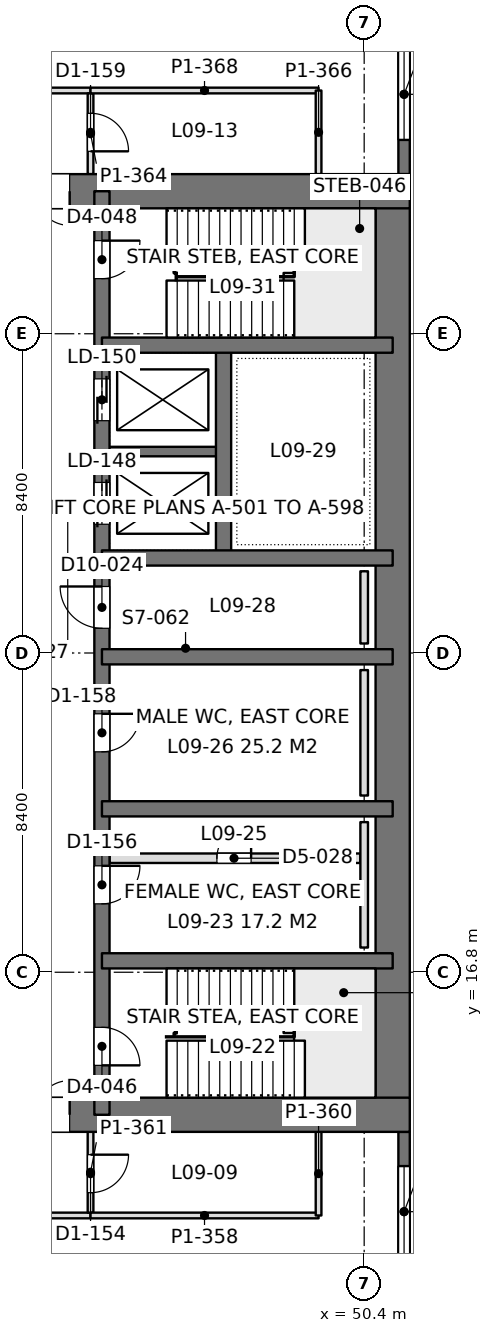
"""IFC4 building model, lengths in metres.
Left out: names, types, materials, properties, quantities, classifications, styles, units other than length and angle.
Written with IfcOpenShell. Run it as: python <this file> out.ifc"""

import sys

from ifc_helpers import new_model, si_unit, direction, frame, frame_2d, origin, place, context, subcontext, project, spatial, rectangle, extrude, element, fill, save


model = new_model("IFC4")
c1 = context("Model", 3, precision=1e-05, world=origin(), true_north=direction((0.0, 1.0)))
c2 = subcontext(c1, "Body", "Model", "MODEL_VIEW")
j1 = project(units=[si_unit("LENGTHUNIT", "METRE"), si_unit("PLANEANGLEUNIT", "RADIAN")], contexts=[c1])
p1 = place(None, origin())
s1 = spatial("IfcSite", under=j1, at=p1, CompositionType="ELEMENT")
p2 = place(p1, origin())
s2 = spatial("IfcBuilding", under=s1, at=p2, CompositionType="ELEMENT")
p3 = place(p2, frame((0.0, 0.0, 41.4)))
s3 = spatial("IfcBuildingStorey", under=s2, at=p3, CompositionType="ELEMENT", Elevation=41.4)
p4 = place(p3, frame((33.6, 13.05, 0.0), z_axis=(0.0, 0.0, 1.0), x_axis=(1.0, 0.0, 0.0)))
e1 = element("IfcWall", 1, at=p4, inside=s3, PredefinedType="SHEAR", context=c2, shape_type="SweptSolid", body=[
    extrude(rectangle(XDim=18.0, YDim=0.9, at=frame_2d((9.0, 0.0))), origin(), (0.0, 0.0, 1.0), 4.5),
])
p5 = place(p4, frame((7.25, 0.0, 0.0)))
e2 = element("IfcOpeningElement", 2, at=p5, cuts=e1, PredefinedType="OPENING", context=c2, shape_type="SweptSolid", body=[
    extrude(rectangle(XDim=1.8, YDim=2.4, at=frame_2d((0.9, 1.2))), frame((0.0, 0.46, 0.0), z_axis=(0.0, -1.0, 0.0), x_axis=(1.0, 0.0, 0.0)), (0.0, 0.0, 1.0), 0.92),
])
p6 = place(p3, frame((33.6, 37.35, 0.0), z_axis=(0.0, 0.0, 1.0), x_axis=(1.0, 0.0, 0.0)))
e3 = element("IfcWall", 3, at=p6, inside=s3, PredefinedType="SHEAR", context=c2, shape_type="SweptSolid", body=[
    extrude(rectangle(XDim=18.0, YDim=0.9, at=frame_2d((9.0, 0.0))), origin(), (0.0, 0.0, 1.0), 4.5),
])
p7 = place(p6, frame((7.25, 0.0, 0.0)))
e4 = element("IfcOpeningElement", 4, at=p7, cuts=e3, PredefinedType="OPENING", context=c2, shape_type="SweptSolid", body=[
    extrude(rectangle(XDim=1.8, YDim=2.4, at=frame_2d((0.9, 1.2))), frame((0.0, 0.46, 0.0), z_axis=(0.0, -1.0, 0.0), x_axis=(1.0, 0.0, 0.0)), (0.0, 0.0, 1.0), 0.92),
])
p8 = place(p3, frame((51.15, 13.05, 0.0), z_axis=(0.0, 0.0, 1.0), x_axis=(0.0, 1.0, 0.0)))
e5 = element("IfcWall", 5, at=p8, inside=s3, PredefinedType="SHEAR", context=c2, shape_type="SweptSolid", body=[
    extrude(rectangle(XDim=24.3, YDim=0.9, at=frame_2d((12.15, 0.0))), origin(), (0.0, 0.0, 1.0), 4.5),
])
p9 = place(p3, frame((43.5, 13.05, 0.0), z_axis=(0.0, 0.0, 1.0), x_axis=(0.0, 1.0, 0.0)))
e6 = element("IfcWall", 6, at=p9, inside=s3, PredefinedType="SHEAR", context=c2, shape_type="SweptSolid", body=[
    extrude(rectangle(XDim=24.3, YDim=0.4, at=frame_2d((12.15, 0.0))), origin(), (0.0, 0.0, 1.0), 4.5),
])
p10 = place(p9, frame((1.3, 0.0, 0.0)))
e7 = element("IfcOpeningElement", 7, at=p10, cuts=e6, PredefinedType="OPENING", context=c2, shape_type="SweptSolid", body=[
    extrude(rectangle(XDim=1.0, YDim=2.2, at=frame_2d((0.5, 1.1))), frame((0.0, 0.21, 0.0), z_axis=(0.0, -1.0, 0.0), x_axis=(1.0, 0.0, 0.0)), (0.0, 0.0, 1.0), 0.42),
])
p11 = place(p9, frame((22.0, 0.0, 0.0)))
e8 = element("IfcOpeningElement", 8, at=p11, cuts=e6, PredefinedType="OPENING", context=c2, shape_type="SweptSolid", body=[
    extrude(rectangle(XDim=1.0, YDim=2.2, at=frame_2d((0.5, 1.1))), frame((0.0, 0.21, 0.0), z_axis=(0.0, -1.0, 0.0), x_axis=(1.0, 0.0, 0.0)), (0.0, 0.0, 1.0), 0.42),
])
p12 = place(p9, frame((5.55, 0.0, 0.0)))
e9 = element("IfcOpeningElement", 9, at=p12, cuts=e6, PredefinedType="OPENING", context=c2, shape_type="SweptSolid", body=[
    extrude(rectangle(XDim=1.0, YDim=2.2, at=frame_2d((0.5, 1.1))), frame((0.0, 0.21, 0.0), z_axis=(0.0, -1.0, 0.0), x_axis=(1.0, 0.0, 0.0)), (0.0, 0.0, 1.0), 0.42),
])
p13 = place(p9, frame((9.55, 0.0, 0.0)))
e10 = element("IfcOpeningElement", 10, at=p13, cuts=e6, PredefinedType="OPENING", context=c2, shape_type="SweptSolid", body=[
    extrude(rectangle(XDim=1.0, YDim=2.2, at=frame_2d((0.5, 1.1))), frame((0.0, 0.21, 0.0), z_axis=(0.0, -1.0, 0.0), x_axis=(1.0, 0.0, 0.0)), (0.0, 0.0, 1.0), 0.42),
])
p14 = place(p9, frame((12.8, 0.0, 0.0)))
e11 = element("IfcOpeningElement", 11, at=p14, cuts=e6, PredefinedType="OPENING", context=c2, shape_type="SweptSolid", body=[
    extrude(rectangle(XDim=1.1, YDim=2.2, at=frame_2d((0.55, 1.1))), frame((0.0, 0.21, 0.0), z_axis=(0.0, -1.0, 0.0), x_axis=(1.0, 0.0, 0.0)), (0.0, 0.0, 1.0), 0.42),
])
p15 = place(p9, frame((15.538, 0.0, 0.0)))
e12 = element("IfcOpeningElement", 12, at=p15, cuts=e6, PredefinedType="OPENING", context=c2, shape_type="SweptSolid", body=[
    extrude(rectangle(XDim=1.1, YDim=2.2, at=frame_2d((0.55, 1.1))), frame((0.0, 0.21, 0.0), z_axis=(0.0, -1.0, 0.0), x_axis=(1.0, 0.0, 0.0)), (0.0, 0.0, 1.0), 0.42),
])
p16 = place(p9, frame((18.262, 0.0, 0.0)))
e13 = element("IfcOpeningElement", 13, at=p16, cuts=e6, PredefinedType="OPENING", context=c2, shape_type="SweptSolid", body=[
    extrude(rectangle(XDim=1.1, YDim=2.2, at=frame_2d((0.55, 1.1))), frame((0.0, 0.21, 0.0), z_axis=(0.0, -1.0, 0.0), x_axis=(1.0, 0.0, 0.0)), (0.0, 0.0, 1.0), 0.42),
])
for number, where, z_axis, x_axis in (
    (14, (51.15, 17.1, 0.0), (0.0, 0.0, 1.0), (-1.0, 0.0, 0.0)),
    (15, (51.15, 21.1, 0.0), (0.0, 0.0, 1.0), (-1.0, 0.0, 0.0)),
    (16, (51.15, 25.1, 0.0), (0.0, 0.0, 1.0), (-1.0, 0.0, 0.0)),
    (17, (51.15, 27.7, 0.0), (0.0, 0.0, 1.0), (-1.0, 0.0, 0.0)),
    (18, (51.15, 33.3, 0.0), (0.0, 0.0, 1.0), (-1.0, 0.0, 0.0)),
):
    element("IfcWall", number, at=place(p3, frame(where, z_axis=z_axis, x_axis=x_axis)), inside=s3, PredefinedType="SHEAR", context=c2, shape_type="SweptSolid", body=[
        extrude(rectangle(XDim=7.65, YDim=0.4, at=frame_2d((3.825, 0.0))), origin(), (0.0, 0.0, 1.0), 4.5),
    ])
p17 = place(p3, frame((46.7, 27.7, 0.0), z_axis=(0.0, 0.0, 1.0), x_axis=(0.0, 1.0, 0.0)))
e19 = element("IfcWall", 19, at=p17, inside=s3, PredefinedType="SHEAR", context=c2, shape_type="SweptSolid", body=[
    extrude(rectangle(XDim=5.6, YDim=0.4, at=frame_2d((2.8, 0.0))), origin(), (0.0, 0.0, 1.0), 4.5),
])
p18 = place(p3, frame((46.7, 30.5, 0.0), z_axis=(0.0, 0.0, 1.0), x_axis=(-1.0, 0.0, 0.0)))
e20 = element("IfcWall", 20, at=p18, inside=s3, PredefinedType="SHEAR", context=c2, shape_type="SweptSolid", body=[
    extrude(rectangle(XDim=3.2, YDim=0.25, at=frame_2d((1.6, 0.0))), origin(), (0.0, 0.0, 1.0), 4.5),
])
p19 = place(p3, frame((51.45, 42.0, 0.0), z_axis=(0.0, 0.0, 1.0), x_axis=(0.0, -1.0, 0.0)))
e21 = element("IfcWall", 21, at=p19, inside=s3, PredefinedType="SOLIDWALL", context=c2, shape_type="SweptSolid", body=[
    extrude(rectangle(XDim=4.2, YDim=0.3, at=frame_2d((2.1, 0.0))), origin(), (0.0, 0.0, 1.0), 4.34),
])
p20 = place(p19, frame((0.9, 0.0, 0.9)))
e22 = element("IfcOpeningElement", 22, at=p20, cuts=e21, PredefinedType="OPENING", context=c2, shape_type="SweptSolid", body=[
    extrude(rectangle(XDim=2.4, YDim=1.9, at=frame_2d((1.2, 0.95))), frame((0.0, 0.16, 0.0), z_axis=(0.0, -1.0, 0.0), x_axis=(1.0, 0.0, 0.0)), (0.0, 0.0, 1.0), 0.32),
])
p21 = place(p3, frame((51.45, 12.6, 0.0), z_axis=(0.0, 0.0, 1.0), x_axis=(0.0, -1.0, 0.0)))
e23 = element("IfcWall", 23, at=p21, inside=s3, PredefinedType="SOLIDWALL", context=c2, shape_type="SweptSolid", body=[
    extrude(rectangle(XDim=4.2, YDim=0.3, at=frame_2d((2.1, 0.0))), origin(), (0.0, 0.0, 1.0), 4.34),
])
p22 = place(p21, frame((0.9, 0.0, 0.9)))
e24 = element("IfcOpeningElement", 24, at=p22, cuts=e23, PredefinedType="OPENING", context=c2, shape_type="SweptSolid", body=[
    extrude(rectangle(XDim=2.4, YDim=1.9, at=frame_2d((1.2, 0.95))), frame((0.0, 0.16, 0.0), z_axis=(0.0, -1.0, 0.0), x_axis=(1.0, 0.0, 0.0)), (0.0, 0.0, 1.0), 0.32),
])
p23 = place(p3, frame((1.2, 10.4, 0.0), z_axis=(0.0, 0.0, 1.0), x_axis=(1.0, 0.0, 0.0)))
e25 = element("IfcWall", 25, at=p23, inside=s3, PredefinedType="PARTITIONING", context=c2, shape_type="SweptSolid", body=[
    extrude(rectangle(XDim=42.002, YDim=0.15, at=frame_2d((21.001, 0.0))), origin(), (0.0, 0.0, 1.0), 3.74),
])
p24 = place(p23, frame((2.1, 0.0, 0.0)))
e26 = element("IfcOpeningElement", 26, at=p24, cuts=e25, PredefinedType="OPENING", context=c2, shape_type="SweptSolid", body=[
    extrude(rectangle(XDim=1.8, YDim=2.2, at=frame_2d((0.9, 1.1))), frame((0.0, 0.085, 0.0), z_axis=(0.0, -1.0, 0.0), x_axis=(1.0, 0.0, 0.0)), (0.0, 0.0, 1.0), 0.17),
])
p25 = place(p23, frame((10.5, 0.0, 0.0)))
e27 = element("IfcOpeningElement", 27, at=p25, cuts=e25, PredefinedType="OPENING", context=c2, shape_type="SweptSolid", body=[
    extrude(rectangle(XDim=1.8, YDim=2.2, at=frame_2d((0.9, 1.1))), frame((0.0, 0.085, 0.0), z_axis=(0.0, -1.0, 0.0), x_axis=(1.0, 0.0, 0.0)), (0.0, 0.0, 1.0), 0.17),
])
p26 = place(p23, frame((18.9, 0.0, 0.0)))
e28 = element("IfcOpeningElement", 28, at=p26, cuts=e25, PredefinedType="OPENING", context=c2, shape_type="SweptSolid", body=[
    extrude(rectangle(XDim=1.8, YDim=2.2, at=frame_2d((0.9, 1.1))), frame((0.0, 0.085, 0.0), z_axis=(0.0, -1.0, 0.0), x_axis=(1.0, 0.0, 0.0)), (0.0, 0.0, 1.0), 0.17),
])
p27 = place(p23, frame((27.3, 0.0, 0.0)))
e29 = element("IfcOpeningElement", 29, at=p27, cuts=e25, PredefinedType="OPENING", context=c2, shape_type="SweptSolid", body=[
    extrude(rectangle(XDim=1.8, YDim=2.2, at=frame_2d((0.9, 1.1))), frame((0.0, 0.085, 0.0), z_axis=(0.0, -1.0, 0.0), x_axis=(1.0, 0.0, 0.0)), (0.0, 0.0, 1.0), 0.17),
])
p28 = place(p23, frame((35.7, 0.0, 0.0)))
e30 = element("IfcOpeningElement", 30, at=p28, cuts=e25, PredefinedType="OPENING", context=c2, shape_type="SweptSolid", body=[
    extrude(rectangle(XDim=1.8, YDim=2.2, at=frame_2d((0.9, 1.1))), frame((0.0, 0.085, 0.0), z_axis=(0.0, -1.0, 0.0), x_axis=(1.0, 0.0, 0.0)), (0.0, 0.0, 1.0), 0.17),
])
p29 = place(p3, frame((43.2, 10.474, 0.0), z_axis=(0.0, 0.0, 1.0), x_axis=(0.0, 1.0, 0.0)))
e31 = element("IfcWall", 31, at=p29, inside=s3, PredefinedType="PARTITIONING", context=c2, shape_type="SweptSolid", body=[
    extrude(rectangle(XDim=2.128, YDim=0.15, at=frame_2d((1.064, 0.0))), origin(), (0.0, 0.0, 1.0), 4.34),
])
p30 = place(p29, frame((0.526, 0.0, 0.0)))
e32 = element("IfcOpeningElement", 32, at=p30, cuts=e31, PredefinedType="OPENING", context=c2, shape_type="SweptSolid", body=[
    extrude(rectangle(XDim=1.0, YDim=2.2, at=frame_2d((0.5, 1.1))), frame((0.0, 0.085, 0.0), z_axis=(0.0, -1.0, 0.0), x_axis=(1.0, 0.0, 0.0)), (0.0, 0.0, 1.0), 0.17),
])
p31 = place(p3, frame((43.198, 10.4, 0.0), z_axis=(0.0, 0.0, 1.0), x_axis=(1.0, 0.0, 0.0)))
e33 = element("IfcWall", 33, at=p31, inside=s3, PredefinedType="PARTITIONING", context=c2, shape_type="SweptSolid", body=[
    extrude(rectangle(XDim=6.002, YDim=0.15, at=frame_2d((3.001, 0.0))), origin(), (0.0, 0.0, 1.0), 4.34),
])
p32 = place(p3, frame((49.2, 10.4, 0.0), z_axis=(0.0, 0.0, 1.0), x_axis=(0.0, 1.0, 0.0)))
e34 = element("IfcWall", 34, at=p32, inside=s3, PredefinedType="PARTITIONING", context=c2, shape_type="SweptSolid", body=[
    extrude(rectangle(XDim=2.202, YDim=0.15, at=frame_2d((1.101, 0.0))), origin(), (0.0, 0.0, 1.0), 4.34),
])
p33 = place(p3, frame((1.2, 40.0, 0.0), z_axis=(0.0, 0.0, 1.0), x_axis=(1.0, 0.0, 0.0)))
e35 = element("IfcWall", 35, at=p33, inside=s3, PredefinedType="PARTITIONING", context=c2, shape_type="SweptSolid", body=[
    extrude(rectangle(XDim=42.002, YDim=0.15, at=frame_2d((21.001, 0.0))), origin(), (0.0, 0.0, 1.0), 3.74),
])
p34 = place(p33, frame((2.1, 0.0, 0.0)))
e36 = element("IfcOpeningElement", 36, at=p34, cuts=e35, PredefinedType="OPENING", context=c2, shape_type="SweptSolid", body=[
    extrude(rectangle(XDim=1.8, YDim=2.2, at=frame_2d((0.9, 1.1))), frame((0.0, 0.085, 0.0), z_axis=(0.0, -1.0, 0.0), x_axis=(1.0, 0.0, 0.0)), (0.0, 0.0, 1.0), 0.17),
])
p35 = place(p33, frame((10.5, 0.0, 0.0)))
e37 = element("IfcOpeningElement", 37, at=p35, cuts=e35, PredefinedType="OPENING", context=c2, shape_type="SweptSolid", body=[
    extrude(rectangle(XDim=1.8, YDim=2.2, at=frame_2d((0.9, 1.1))), frame((0.0, 0.085, 0.0), z_axis=(0.0, -1.0, 0.0), x_axis=(1.0, 0.0, 0.0)), (0.0, 0.0, 1.0), 0.17),
])
p36 = place(p33, frame((18.9, 0.0, 0.0)))
e38 = element("IfcOpeningElement", 38, at=p36, cuts=e35, PredefinedType="OPENING", context=c2, shape_type="SweptSolid", body=[
    extrude(rectangle(XDim=1.8, YDim=2.2, at=frame_2d((0.9, 1.1))), frame((0.0, 0.085, 0.0), z_axis=(0.0, -1.0, 0.0), x_axis=(1.0, 0.0, 0.0)), (0.0, 0.0, 1.0), 0.17),
])
p37 = place(p33, frame((27.3, 0.0, 0.0)))
e39 = element("IfcOpeningElement", 39, at=p37, cuts=e35, PredefinedType="OPENING", context=c2, shape_type="SweptSolid", body=[
    extrude(rectangle(XDim=1.8, YDim=2.2, at=frame_2d((0.9, 1.1))), frame((0.0, 0.085, 0.0), z_axis=(0.0, -1.0, 0.0), x_axis=(1.0, 0.0, 0.0)), (0.0, 0.0, 1.0), 0.17),
])
p38 = place(p33, frame((35.7, 0.0, 0.0)))
e40 = element("IfcOpeningElement", 40, at=p38, cuts=e35, PredefinedType="OPENING", context=c2, shape_type="SweptSolid", body=[
    extrude(rectangle(XDim=1.8, YDim=2.2, at=frame_2d((0.9, 1.1))), frame((0.0, 0.085, 0.0), z_axis=(0.0, -1.0, 0.0), x_axis=(1.0, 0.0, 0.0)), (0.0, 0.0, 1.0), 0.17),
])
p39 = place(p3, frame((43.2, 37.8, 0.0), z_axis=(0.0, 0.0, 1.0), x_axis=(0.0, 1.0, 0.0)))
e41 = element("IfcWall", 41, at=p39, inside=s3, PredefinedType="PARTITIONING", context=c2, shape_type="SweptSolid", body=[
    extrude(rectangle(XDim=2.126, YDim=0.15, at=frame_2d((1.063, 0.0))), origin(), (0.0, 0.0, 1.0), 4.34),
])
p40 = place(p39, frame((0.6, 0.0, 0.0)))
e42 = element("IfcOpeningElement", 42, at=p40, cuts=e41, PredefinedType="OPENING", context=c2, shape_type="SweptSolid", body=[
    extrude(rectangle(XDim=1.0, YDim=2.2, at=frame_2d((0.5, 1.1))), frame((0.0, 0.085, 0.0), z_axis=(0.0, -1.0, 0.0), x_axis=(1.0, 0.0, 0.0)), (0.0, 0.0, 1.0), 0.17),
])
p41 = place(p3, frame((43.198, 40.0, 0.0), z_axis=(0.0, 0.0, 1.0), x_axis=(1.0, 0.0, 0.0)))
e43 = element("IfcWall", 43, at=p41, inside=s3, PredefinedType="PARTITIONING", context=c2, shape_type="SweptSolid", body=[
    extrude(rectangle(XDim=6.002, YDim=0.15, at=frame_2d((3.001, 0.0))), origin(), (0.0, 0.0, 1.0), 3.98),
])
p42 = place(p3, frame((49.2, 37.8, 0.0), z_axis=(0.0, 0.0, 1.0), x_axis=(0.0, 1.0, 0.0)))
e44 = element("IfcWall", 44, at=p42, inside=s3, PredefinedType="PARTITIONING", context=c2, shape_type="SweptSolid", body=[
    extrude(rectangle(XDim=2.2, YDim=0.15, at=frame_2d((1.1, 0.0))), origin(), (0.0, 0.0, 1.0), 4.34),
])
p43 = place(p3, frame((43.7, 19.8, 0.0), z_axis=(0.0, 0.0, 1.0), x_axis=(1.0, 0.0, 0.0)))
e45 = element("IfcWall", 45, at=p43, inside=s3, PredefinedType="PARTITIONING", context=c2, shape_type="SweptSolid", body=[
    extrude(rectangle(XDim=6.6, YDim=0.25, at=frame_2d((3.3, 0.0))), origin(), (0.0, 0.0, 1.0), 4.3),
])
p44 = place(p43, frame((2.825, 0.0, 0.0)))
e46 = element("IfcOpeningElement", 46, at=p44, cuts=e45, PredefinedType="OPENING", context=c2, shape_type="SweptSolid", body=[
    extrude(rectangle(XDim=0.9, YDim=2.2, at=frame_2d((0.45, 1.1))), frame((0.0, 0.135, 0.0), z_axis=(0.0, -1.0, 0.0), x_axis=(1.0, 0.0, 0.0)), (0.0, 0.0, 1.0), 0.27),
])
for number, where, z_axis, x_axis in (
    (47, (50.4, 17.45, 0.0), (0.0, 0.0, 1.0), (0.0, 1.0, 0.0)),
    (48, (50.4, 21.45, 0.0), (0.0, 0.0, 1.0), (0.0, 1.0, 0.0)),
):
    element("IfcWall", number, at=place(p3, frame(where, z_axis=z_axis, x_axis=x_axis)), inside=s3, PredefinedType="PLUMBINGWALL", context=c2, shape_type="SweptSolid", body=[
        extrude(rectangle(XDim=3.3, YDim=0.2, at=frame_2d((1.65, 0.0))), origin(), (0.0, 0.0, 1.0), 1.2),
    ])
p45 = place(p3, frame((50.4, 25.45, 0.0), z_axis=(0.0, 0.0, 1.0), x_axis=(0.0, 1.0, 0.0)))
e49 = element("IfcWall", 49, at=p45, inside=s3, PredefinedType="PLUMBINGWALL", context=c2, shape_type="SweptSolid", body=[
    extrude(rectangle(XDim=1.9, YDim=0.2, at=frame_2d((0.95, 0.0))), origin(), (0.0, 0.0, 1.0), 1.2),
])
p46 = place(p20, origin())
e50 = element("IfcWindow", 50, at=p46, inside=s3, PartitioningType="SINGLE_PANEL", PredefinedType="WINDOW", context=c2, shape_type="SweptSolid", body=[
    extrude(rectangle(XDim=2.4, YDim=1.9, at=frame_2d((1.2, 0.95))), frame((0.0, 0.03, 0.0), z_axis=(0.0, -1.0, 0.0), x_axis=(1.0, 0.0, 0.0)), (0.0, 0.0, 1.0), 0.06),
])
fill(e22, e50)
p47 = place(p22, origin())
e51 = element("IfcWindow", 51, at=p47, inside=s3, PartitioningType="SINGLE_PANEL", PredefinedType="WINDOW", context=c2, shape_type="SweptSolid", body=[
    extrude(rectangle(XDim=2.4, YDim=1.9, at=frame_2d((1.2, 0.95))), frame((0.0, 0.03, 0.0), z_axis=(0.0, -1.0, 0.0), x_axis=(1.0, 0.0, 0.0)), (0.0, 0.0, 1.0), 0.06),
])
fill(e24, e51)
p48 = place(p5, origin())
e52 = element("IfcDoor", 52, at=p48, inside=s3, OperationType="DOUBLE_DOOR_SINGLE_SWING", PredefinedType="DOOR", context=c2, shape_type="SweptSolid", body=[
    extrude(rectangle(XDim=1.8, YDim=2.4, at=frame_2d((0.9, 1.2))), frame((0.0, 0.025, 0.0), z_axis=(0.0, -1.0, 0.0), x_axis=(1.0, 0.0, 0.0)), (0.0, 0.0, 1.0), 0.05),
])
fill(e2, e52)
p49 = place(p7, frame((1.8, 0.0, 0.0), z_axis=(0.0, 0.0, 1.0), x_axis=(-1.0, 0.0, 0.0)))
e53 = element("IfcDoor", 53, at=p49, inside=s3, OperationType="DOUBLE_DOOR_SINGLE_SWING", PredefinedType="DOOR", context=c2, shape_type="SweptSolid", body=[
    extrude(rectangle(XDim=1.8, YDim=2.4, at=frame_2d((0.9, 1.2))), frame((0.0, 0.025, 0.0), z_axis=(0.0, -1.0, 0.0), x_axis=(1.0, 0.0, 0.0)), (0.0, 0.0, 1.0), 0.05),
])
fill(e4, e53)
p50 = place(p10, frame((1.0, 0.0, 0.0), z_axis=(0.0, 0.0, 1.0), x_axis=(-1.0, 0.0, 0.0)))
e54 = element("IfcDoor", 54, at=p50, inside=s3, OperationType="SINGLE_SWING_RIGHT", PredefinedType="DOOR", context=c2, shape_type="SweptSolid", body=[
    extrude(rectangle(XDim=1.0, YDim=2.2, at=frame_2d((0.5, 1.1))), frame((0.0, 0.025, 0.0), z_axis=(0.0, -1.0, 0.0), x_axis=(1.0, 0.0, 0.0)), (0.0, 0.0, 1.0), 0.05),
])
fill(e7, e54)
p51 = place(p11, frame((1.0, 0.0, 0.0), z_axis=(0.0, 0.0, 1.0), x_axis=(-1.0, 0.0, 0.0)))
e55 = element("IfcDoor", 55, at=p51, inside=s3, OperationType="SINGLE_SWING_LEFT", PredefinedType="DOOR", context=c2, shape_type="SweptSolid", body=[
    extrude(rectangle(XDim=1.0, YDim=2.2, at=frame_2d((0.5, 1.1))), frame((0.0, 0.025, 0.0), z_axis=(0.0, -1.0, 0.0), x_axis=(1.0, 0.0, 0.0)), (0.0, 0.0, 1.0), 0.05),
])
fill(e8, e55)
p52 = place(p12, frame((1.0, 0.0, 0.0), z_axis=(0.0, 0.0, 1.0), x_axis=(-1.0, 0.0, 0.0)))
e56 = element("IfcDoor", 56, at=p52, inside=s3, OperationType="SINGLE_SWING_LEFT", PredefinedType="DOOR", context=c2, shape_type="SweptSolid", body=[
    extrude(rectangle(XDim=1.0, YDim=2.2, at=frame_2d((0.5, 1.1))), frame((0.0, 0.025, 0.0), z_axis=(0.0, -1.0, 0.0), x_axis=(1.0, 0.0, 0.0)), (0.0, 0.0, 1.0), 0.05),
])
fill(e9, e56)
p53 = place(p13, frame((1.0, 0.0, 0.0), z_axis=(0.0, 0.0, 1.0), x_axis=(-1.0, 0.0, 0.0)))
e57 = element("IfcDoor", 57, at=p53, inside=s3, OperationType="SINGLE_SWING_LEFT", PredefinedType="DOOR", context=c2, shape_type="SweptSolid", body=[
    extrude(rectangle(XDim=1.0, YDim=2.2, at=frame_2d((0.5, 1.1))), frame((0.0, 0.025, 0.0), z_axis=(0.0, -1.0, 0.0), x_axis=(1.0, 0.0, 0.0)), (0.0, 0.0, 1.0), 0.05),
])
fill(e10, e57)
p54 = place(p14, origin())
e58 = element("IfcDoor", 58, at=p54, inside=s3, OperationType="SINGLE_SWING_RIGHT", PredefinedType="DOOR", context=c2, shape_type="SweptSolid", body=[
    extrude(rectangle(XDim=1.1, YDim=2.2, at=frame_2d((0.55, 1.1))), frame((0.0, 0.025, 0.0), z_axis=(0.0, -1.0, 0.0), x_axis=(1.0, 0.0, 0.0)), (0.0, 0.0, 1.0), 0.05),
])
fill(e11, e58)
p55 = place(p15, origin())
e59 = element("IfcDoor", 59, at=p55, inside=s3, OperationType="DOUBLE_DOOR_SLIDING", PredefinedType="DOOR", context=c2, shape_type="SweptSolid", body=[
    extrude(rectangle(XDim=1.1, YDim=2.2, at=frame_2d((0.55, 1.1))), frame((0.0, 0.025, 0.0), z_axis=(0.0, -1.0, 0.0), x_axis=(1.0, 0.0, 0.0)), (0.0, 0.0, 1.0), 0.05),
])
fill(e12, e59)
p56 = place(p16, origin())
e60 = element("IfcDoor", 60, at=p56, inside=s3, OperationType="DOUBLE_DOOR_SLIDING", PredefinedType="DOOR", context=c2, shape_type="SweptSolid", body=[
    extrude(rectangle(XDim=1.1, YDim=2.2, at=frame_2d((0.55, 1.1))), frame((0.0, 0.025, 0.0), z_axis=(0.0, -1.0, 0.0), x_axis=(1.0, 0.0, 0.0)), (0.0, 0.0, 1.0), 0.05),
])
fill(e13, e60)
p57 = place(p30, frame((1.0, 0.0, 0.0), z_axis=(0.0, 0.0, 1.0), x_axis=(-1.0, 0.0, 0.0)))
e61 = element("IfcDoor", 61, at=p57, inside=s3, OperationType="SINGLE_SWING_LEFT", PredefinedType="DOOR", context=c2, shape_type="SweptSolid", body=[
    extrude(rectangle(XDim=1.0, YDim=2.2, at=frame_2d((0.5, 1.1))), frame((0.0, 0.025, 0.0), z_axis=(0.0, -1.0, 0.0), x_axis=(1.0, 0.0, 0.0)), (0.0, 0.0, 1.0), 0.05),
])
fill(e32, e61)
p58 = place(p40, frame((1.0, 0.0, 0.0), z_axis=(0.0, 0.0, 1.0), x_axis=(-1.0, 0.0, 0.0)))
e62 = element("IfcDoor", 62, at=p58, inside=s3, OperationType="SINGLE_SWING_RIGHT", PredefinedType="DOOR", context=c2, shape_type="SweptSolid", body=[
    extrude(rectangle(XDim=1.0, YDim=2.2, at=frame_2d((0.5, 1.1))), frame((0.0, 0.025, 0.0), z_axis=(0.0, -1.0, 0.0), x_axis=(1.0, 0.0, 0.0)), (0.0, 0.0, 1.0), 0.05),
])
fill(e42, e62)
p59 = place(p44, origin())
e63 = element("IfcDoor", 63, at=p59, inside=s3, OperationType="SINGLE_SWING_RIGHT", PredefinedType="DOOR", context=c2, shape_type="SweptSolid", body=[
    extrude(rectangle(XDim=0.9, YDim=2.2, at=frame_2d((0.45, 1.1))), frame((0.0, 0.025, 0.0), z_axis=(0.0, -1.0, 0.0), x_axis=(1.0, 0.0, 0.0)), (0.0, 0.0, 1.0), 0.05),
])
fill(e46, e63)
save(model, sys.argv[1])
